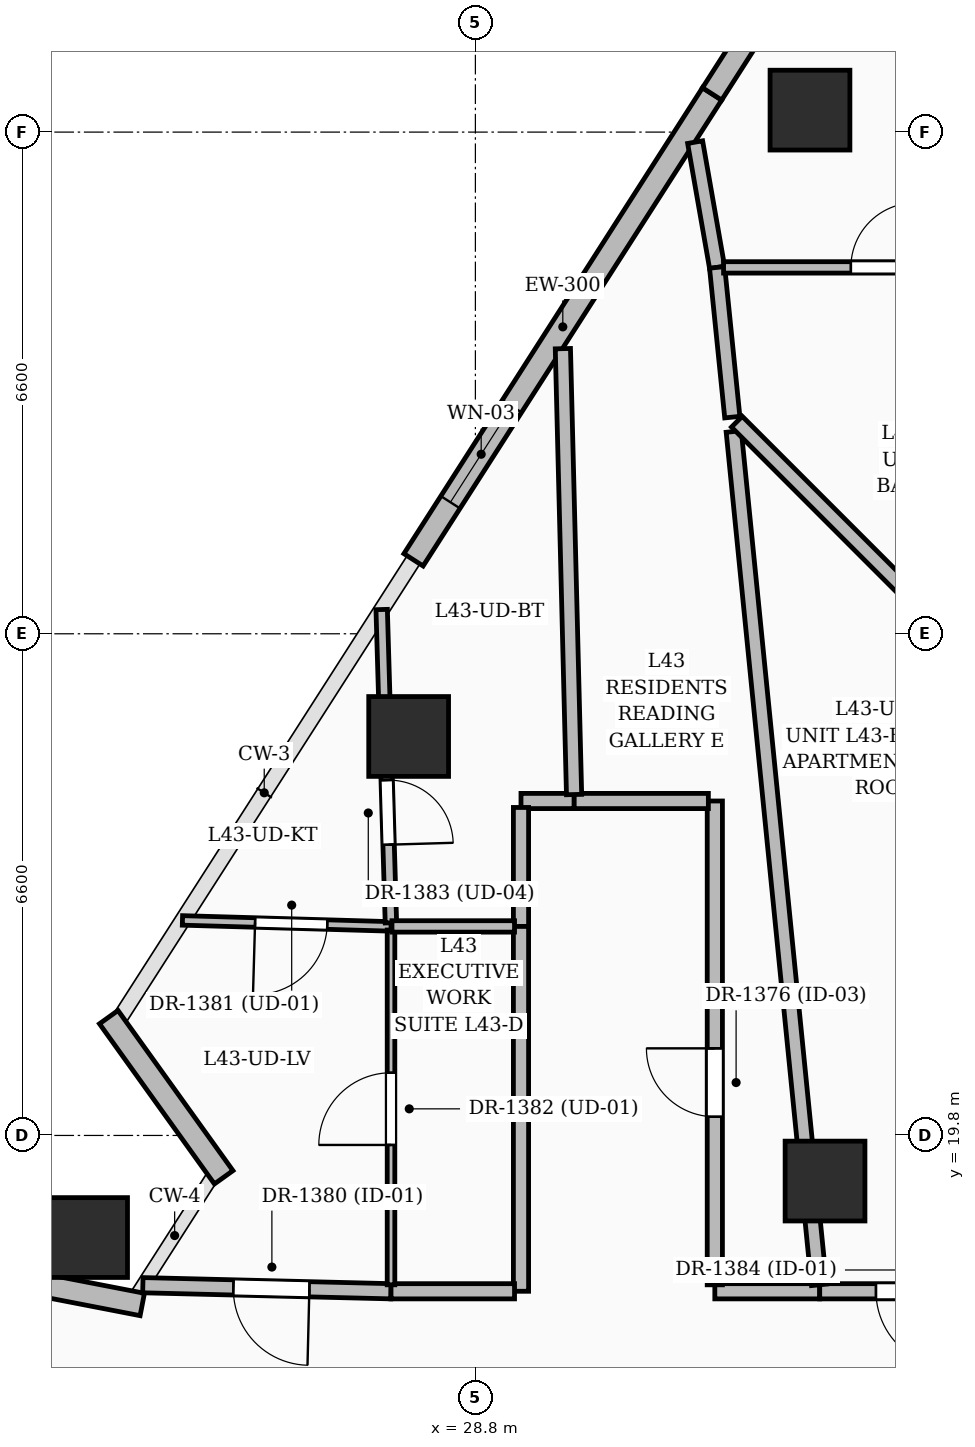
"""IFC4 building model, lengths in metres.
Left out: names, types, materials, properties, quantities, classifications, styles, units other than length and angle.
Written with IfcOpenShell. Run it as: python <this file> out.ifc"""

import sys

from ifc_helpers import new_model, si_unit, direction, frame, frame_2d, origin, origin_2d, place, context, subcontext, project, spatial, rectangle, extrude, element, fill, save


model = new_model("IFC4")
c1 = context("Model", 3, precision=1e-05, world=origin(), true_north=direction((0.0, 1.0)))
c2 = subcontext(c1, "Body", "Model", "MODEL_VIEW")
j1 = project(units=[si_unit("LENGTHUNIT", "METRE"), si_unit("PLANEANGLEUNIT", "RADIAN")], contexts=[c1])
p1 = place(None, origin())
s1 = spatial("IfcSite", under=j1, at=p1, CompositionType="ELEMENT")
p2 = place(p1, origin())
s2 = spatial("IfcBuilding", under=s1, at=p2, CompositionType="ELEMENT")
p3 = place(p2, frame((0.0, 0.0, 168.0)))
s3 = spatial("IfcBuildingStorey", under=s2, at=p3, CompositionType="ELEMENT", Elevation=168.0)
for number, where, z_axis, x_axis in (
    (1, (33.4, 19.2, 0.0), (0.0, 0.0, 1.0), (1.0, 0.0, 0.0)),
    (2, (33.202, 33.289, 0.0), (0.0, 0.0, 1.0), (1.0, 0.0, 0.0)),
    (3, (27.922, 25.049, 0.0), (0.0, 0.0, 1.0), (1.0, 0.0, 0.0)),
    (4, (23.698, 18.457, 0.0), (0.0, 0.0, 1.0), (1.0, 0.0, 0.0)),
):
    element("IfcColumn", number, at=place(p3, frame(where, z_axis=z_axis, x_axis=x_axis)), inside=s3, PredefinedType="COLUMN", context=c2, shape_type="SweptSolid", body=[
        extrude(rectangle(XDim=1.05, YDim=1.05, at=origin_2d()), origin(), (0.0, 0.0, 1.0), 3.6),
    ])
p4 = place(p3, frame((21.871, 18.07, 0.0), z_axis=(0.0, 0.0, 1.0), x_axis=(0.98176398898, -0.190103839891, 0.0)))
e5 = element("IfcWall", 5, at=p4, inside=s3, PredefinedType="SOLIDWALL", context=c2, shape_type="SweptSolid", body=[
    extrude(rectangle(XDim=2.594, YDim=0.3, at=frame_2d((1.297, 0.0))), origin(), (0.0, 0.0, 1.0), 2.398),
])
p5 = place(p3, frame((25.489, 19.249, 0.0), z_axis=(0.0, 0.0, 1.0), x_axis=(-0.58299973372, 0.812472344442, 0.0)))
e6 = element("IfcWall", 6, at=p5, inside=s3, PredefinedType="SOLIDWALL", context=c2, shape_type="SweptSolid", body=[
    extrude(rectangle(XDim=2.594, YDim=0.3, at=frame_2d((1.297, 0.0))), origin(), (0.0, 0.0, 1.0), 2.575),
])
p6 = place(p3, frame((27.986, 27.373, 0.0), z_axis=(0.0, 0.0, 1.0), x_axis=(0.539557017358, 0.841949063198, 0.0)))
e7 = element("IfcWall", 7, at=p6, inside=s3, PredefinedType="SOLIDWALL", context=c2, shape_type="SweptSolid", body=[
    extrude(rectangle(XDim=7.28, YDim=0.3, at=frame_2d((3.64, 0.0))), origin(), (0.0, 0.0, 1.0), 3.35),
])
p7 = place(p6, frame((0.9, 0.0, 0.6)))
e8 = element("IfcOpeningElement", 8, at=p7, cuts=e7, PredefinedType="OPENING", context=c2, shape_type="SweptSolid", body=[
    extrude(rectangle(XDim=1.5, YDim=2.1, at=frame_2d((0.75, 1.05))), frame((0.0, 0.16, 0.0), z_axis=(0.0, -1.0, 0.0), x_axis=(1.0, 0.0, 0.0)), (0.0, 0.0, 1.0), 0.32),
])
p8 = place(p3, frame((31.914, 33.502, 0.0), z_axis=(0.0, 0.0, 1.0), x_axis=(0.539526549497, 0.84196858753, 0.0)))
e9 = element("IfcWall", 9, at=p8, inside=s3, PredefinedType="SOLIDWALL", context=c2, shape_type="SweptSolid", body=[
    extrude(rectangle(XDim=7.281, YDim=0.3, at=frame_2d((3.64, 0.0))), origin(), (0.0, 0.0, 1.0), 3.35),
])
p9 = place(p8, frame((2.55, 0.0, 0.8)))
e10 = element("IfcOpeningElement", 10, at=p9, cuts=e9, PredefinedType="OPENING", context=c2, shape_type="SweptSolid", body=[
    extrude(rectangle(XDim=1.2, YDim=1.8, at=frame_2d((0.6, 0.9))), frame((0.0, 0.16, 0.0), z_axis=(0.0, -1.0, 0.0), x_axis=(1.0, 0.0, 0.0)), (0.0, 0.0, 1.0), 0.32),
])
p10 = place(p3, frame((27.69, 17.75, 0.0), z_axis=(0.0, 0.0, 1.0), x_axis=(-0.999699347991, 0.024519657978, 0.0)))
e11 = element("IfcWall", 11, at=p10, inside=s3, PredefinedType="PARTITIONING", context=c2, shape_type="SweptSolid", body=[
    extrude(rectangle(XDim=3.266, YDim=0.2, at=frame_2d((1.633, 0.0))), origin(), (0.0, 0.0, 1.0), 2.393),
])
p11 = place(p10, frame((1.075, 0.0, 0.0)))
e12 = element("IfcOpeningElement", 12, at=p11, cuts=e11, PredefinedType="OPENING", context=c2, shape_type="SweptSolid", body=[
    extrude(rectangle(XDim=1.0, YDim=2.2, at=frame_2d((0.5, 1.1))), frame((0.0, 0.11, 0.0), z_axis=(0.0, -1.0, 0.0), x_axis=(1.0, 0.0, 0.0)), (0.0, 0.0, 1.0), 0.22),
])
p12 = place(p3, frame((30.1, 24.2, 0.0), z_axis=(0.0, 0.0, 1.0), x_axis=(-1.0, 0.0, 0.0)))
e13 = element("IfcWall", 13, at=p12, inside=s3, PredefinedType="PARTITIONING", context=c2, shape_type="SweptSolid", body=[
    extrude(rectangle(XDim=0.7, YDim=0.2, at=frame_2d((0.35, 0.0))), origin(), (0.0, 0.0, 1.0), 2.771),
])
p13 = place(p3, frame((29.4, 24.115, 0.0), z_axis=(0.0, 0.0, 1.0), x_axis=(0.0, -1.0, 0.0)))
e14 = element("IfcWall", 14, at=p13, inside=s3, PredefinedType="PARTITIONING", context=c2, shape_type="SweptSolid", body=[
    extrude(rectangle(XDim=1.565, YDim=0.2, at=frame_2d((0.782, 0.0))), origin(), (0.0, 0.0, 1.0), 2.393),
])
p14 = place(p3, frame((29.4, 22.55, 0.0), z_axis=(0.0, 0.0, 1.0), x_axis=(0.0, -1.0, 0.0)))
e15 = element("IfcWall", 15, at=p14, inside=s3, PredefinedType="PARTITIONING", context=c2, shape_type="SweptSolid", body=[
    extrude(rectangle(XDim=4.8, YDim=0.2, at=frame_2d((2.4, 0.0))), origin(), (0.0, 0.0, 1.0), 2.771),
])
p15 = place(p3, frame((29.315, 17.75, 0.0), z_axis=(0.0, 0.0, 1.0), x_axis=(-1.0, 0.0, 0.0)))
e16 = element("IfcWall", 16, at=p15, inside=s3, PredefinedType="PARTITIONING", context=c2, shape_type="SweptSolid", body=[
    extrude(rectangle(XDim=1.625, YDim=0.2, at=frame_2d((0.812, 0.0))), origin(), (0.0, 0.0, 1.0), 2.771),
])
p16 = place(p3, frame((33.33, 17.75, 0.0), z_axis=(0.0, 0.0, 1.0), x_axis=(-1.0, 0.0, 0.0)))
e17 = element("IfcWall", 17, at=p16, inside=s3, PredefinedType="PARTITIONING", context=c2, shape_type="SweptSolid", body=[
    extrude(rectangle(XDim=1.38, YDim=0.2, at=frame_2d((0.69, 0.0))), origin(), (0.0, 0.0, 1.0), 3.35),
])
p17 = place(p3, frame((31.95, 17.835, 0.0), z_axis=(0.0, 0.0, 1.0), x_axis=(0.0, 1.0, 0.0)))
e18 = element("IfcWall", 18, at=p17, inside=s3, PredefinedType="PARTITIONING", context=c2, shape_type="SweptSolid", body=[
    extrude(rectangle(XDim=6.365, YDim=0.2, at=frame_2d((3.183, 0.0))), origin(), (0.0, 0.0, 1.0), 2.393),
])
p18 = place(p17, frame((2.211, 0.0, 0.0)))
e19 = element("IfcOpeningElement", 19, at=p18, cuts=e18, PredefinedType="OPENING", context=c2, shape_type="SweptSolid", body=[
    extrude(rectangle(XDim=0.9, YDim=2.1, at=frame_2d((0.45, 1.05))), frame((0.0, 0.11, 0.0), z_axis=(0.0, -1.0, 0.0), x_axis=(1.0, 0.0, 0.0)), (0.0, 0.0, 1.0), 0.22),
])
p19 = place(p3, frame((31.865, 24.2, 0.0), z_axis=(0.0, 0.0, 1.0), x_axis=(-1.0, 0.0, 0.0)))
e20 = element("IfcWall", 20, at=p19, inside=s3, PredefinedType="PARTITIONING", context=c2, shape_type="SweptSolid", body=[
    extrude(rectangle(XDim=1.765, YDim=0.2, at=frame_2d((0.882, 0.0))), origin(), (0.0, 0.0, 1.0), 2.771),
])
p20 = place(p3, frame((35.69, 17.75, 0.0), z_axis=(0.0, 0.0, 1.0), x_axis=(-1.0, 0.0, 0.0)))
e21 = element("IfcWall", 21, at=p20, inside=s3, PredefinedType="PARTITIONING", context=c2, shape_type="SweptSolid", body=[
    extrude(rectangle(XDim=2.36, YDim=0.2, at=frame_2d((1.18, 0.0))), origin(), (0.0, 0.0, 1.0), 2.436),
])
p21 = place(p20, frame((0.62, 0.0, 0.0)))
e22 = element("IfcOpeningElement", 22, at=p21, cuts=e21, PredefinedType="OPENING", context=c2, shape_type="SweptSolid", body=[
    extrude(rectangle(XDim=1.0, YDim=2.2, at=frame_2d((0.5, 1.1))), frame((0.0, 0.11, 0.0), z_axis=(0.0, -1.0, 0.0), x_axis=(1.0, 0.0, 0.0)), (0.0, 0.0, 1.0), 0.22),
])
p22 = place(p3, frame((27.69, 22.55, 0.0), z_axis=(0.0, 0.0, 1.0), x_axis=(-0.999587284498, 0.028727350555, 0.0)))
e23 = element("IfcWall", 23, at=p22, inside=s3, PredefinedType="PARTITIONING", context=c2, shape_type="SweptSolid", body=[
    extrude(rectangle(XDim=2.745, YDim=0.125, at=frame_2d((1.373, 0.0))), origin(), (0.0, 0.0, 1.0), 2.57),
])
p23 = place(p22, frame((0.839, 0.0, 0.0)))
e24 = element("IfcOpeningElement", 24, at=p23, cuts=e23, PredefinedType="OPENING", context=c2, shape_type="SweptSolid", body=[
    extrude(rectangle(XDim=0.95, YDim=2.2, at=frame_2d((0.475, 1.1))), frame((0.0, 0.072, 0.0), z_axis=(0.0, -1.0, 0.0), x_axis=(1.0, 0.0, 0.0)), (0.0, 0.0, 1.0), 0.145),
])
p24 = place(p3, frame((27.69, 17.835, 0.0), z_axis=(0.0, 0.0, 1.0), x_axis=(0.0, 1.0, 0.0)))
e25 = element("IfcWall", 25, at=p24, inside=s3, PredefinedType="PARTITIONING", context=c2, shape_type="SweptSolid", body=[
    extrude(rectangle(XDim=4.667, YDim=0.1, at=frame_2d((2.334, 0.0))), origin(), (0.0, 0.0, 1.0), 2.771),
])
p25 = place(p24, frame((1.84, 0.0, 0.0)))
e26 = element("IfcOpeningElement", 26, at=p25, cuts=e25, PredefinedType="OPENING", context=c2, shape_type="SweptSolid", body=[
    extrude(rectangle(XDim=0.95, YDim=2.2, at=frame_2d((0.475, 1.1))), frame((0.0, 0.06, 0.0), z_axis=(0.0, -1.0, 0.0), x_axis=(1.0, 0.0, 0.0)), (0.0, 0.0, 1.0), 0.12),
])
p26 = place(p3, frame((27.567, 26.719, 0.0), z_axis=(0.0, 0.0, 1.0), x_axis=(0.029545205492, -0.999563445126, 0.0)))
e27 = element("IfcWall", 27, at=p26, inside=s3, PredefinedType="PARTITIONING", context=c2, shape_type="SweptSolid", body=[
    extrude(rectangle(XDim=4.123, YDim=0.15, at=frame_2d((2.062, 0.0))), origin(), (0.0, 0.0, 1.0), 2.57),
])
p27 = place(p26, frame((2.245, 0.0, 0.0)))
e28 = element("IfcOpeningElement", 28, at=p27, cuts=e27, PredefinedType="OPENING", context=c2, shape_type="SweptSolid", body=[
    extrude(rectangle(XDim=0.85, YDim=2.1, at=frame_2d((0.425, 1.05))), frame((0.0, 0.085, 0.0), z_axis=(0.0, -1.0, 0.0), x_axis=(1.0, 0.0, 0.0)), (0.0, 0.0, 1.0), 0.17),
])
p28 = place(p3, frame((27.702, 22.55, 0.0), z_axis=(0.0, 0.0, 1.0), x_axis=(1.0, 0.0, 0.0)))
e29 = element("IfcWall", 29, at=p28, inside=s3, PredefinedType="PARTITIONING", context=c2, shape_type="SweptSolid", body=[
    extrude(rectangle(XDim=1.613, YDim=0.15, at=frame_2d((0.806, 0.0))), origin(), (0.0, 0.0, 1.0), 2.771),
])
p29 = place(p3, frame((30.098, 24.285, 0.0), z_axis=(0.0, 0.0, 1.0), x_axis=(-0.025130446789, 0.999684180451, 0.0)))
e30 = element("IfcWall", 30, at=p29, inside=s3, PredefinedType="PARTITIONING", context=c2, shape_type="SweptSolid", body=[
    extrude(rectangle(XDim=5.868, YDim=0.2, at=frame_2d((2.934, 0.0))), origin(), (0.0, 0.0, 1.0), 2.57),
])
p30 = place(p3, frame((33.322, 17.835, 0.0), z_axis=(0.0, 0.0, 1.0), x_axis=(-0.099499433927, 0.99503761871, 0.0)))
e31 = element("IfcWall", 31, at=p30, inside=s3, PredefinedType="PARTITIONING", context=c2, shape_type="SweptSolid", body=[
    extrude(rectangle(XDim=11.282, YDim=0.2, at=frame_2d((5.641, 0.0))), origin(), (0.0, 0.0, 1.0), 2.393),
])
p31 = place(p3, frame((31.98, 31.22, 0.0), z_axis=(0.0, 0.0, 1.0), x_axis=(-0.17276967515, 0.984962252753, 0.0)))
e32 = element("IfcWall", 32, at=p31, inside=s3, PredefinedType="PARTITIONING", context=c2, shape_type="SweptSolid", body=[
    extrude(rectangle(XDim=1.673, YDim=0.2, at=frame_2d((0.836, 0.0))), origin(), (0.0, 0.0, 1.0), 2.57),
])
p32 = place(p3, frame((32.18, 29.25, 0.0), z_axis=(0.0, 0.0, 1.0), x_axis=(-0.100980739114, 0.994888380839, 0.0)))
e33 = element("IfcWall", 33, at=p32, inside=s3, PredefinedType="PARTITIONING", context=c2, shape_type="SweptSolid", body=[
    extrude(rectangle(XDim=1.98, YDim=0.2, at=frame_2d((0.99, 0.0))), origin(), (0.0, 0.0, 1.0), 2.57),
])
p33 = place(p3, frame((36.262, 25.168, 0.0), z_axis=(0.0, 0.0, 1.0), x_axis=(-0.707128244111, 0.707085317611, 0.0)))
e34 = element("IfcWall", 34, at=p33, inside=s3, PredefinedType="PARTITIONING", context=c2, shape_type="SweptSolid", body=[
    extrude(rectangle(XDim=5.688, YDim=0.2, at=frame_2d((2.844, 0.0))), origin(), (0.0, 0.0, 1.0), 2.771),
])
p34 = place(p3, frame((32.065, 31.22, 0.0), z_axis=(0.0, 0.0, 1.0), x_axis=(1.0, 0.0, 0.0)))
e35 = element("IfcWall", 35, at=p34, inside=s3, PredefinedType="PARTITIONING", context=c2, shape_type="SweptSolid", body=[
    extrude(rectangle(XDim=4.285, YDim=0.15, at=frame_2d((2.143, 0.0))), origin(), (0.0, 0.0, 1.0), 2.393),
])
p35 = place(p34, frame((1.675, 0.0, 0.0)))
e36 = element("IfcOpeningElement", 36, at=p35, cuts=e35, PredefinedType="OPENING", context=c2, shape_type="SweptSolid", body=[
    extrude(rectangle(XDim=0.85, YDim=2.1, at=frame_2d((0.425, 1.05))), frame((0.0, 0.085, 0.0), z_axis=(0.0, -1.0, 0.0), x_axis=(1.0, 0.0, 0.0)), (0.0, 0.0, 1.0), 0.17),
])
p36 = place(p7, origin())
e37 = element("IfcWindow", 37, at=p36, inside=s3, PartitioningType="SINGLE_PANEL", PredefinedType="WINDOW", context=c2, shape_type="SweptSolid", body=[
    extrude(rectangle(XDim=1.5, YDim=2.1, at=frame_2d((0.75, 1.05))), frame((0.0, 0.03, 0.0), z_axis=(0.0, -1.0, 0.0), x_axis=(1.0, 0.0, 0.0)), (0.0, 0.0, 1.0), 0.06),
])
fill(e8, e37)
p37 = place(p18, origin())
e38 = element("IfcDoor", 38, at=p37, inside=s3, OperationType="SINGLE_SWING_RIGHT", PredefinedType="DOOR", context=c2, shape_type="SweptSolid", body=[
    extrude(rectangle(XDim=0.9, YDim=2.1, at=frame_2d((0.45, 1.05))), frame((0.0, 0.025, 0.0), z_axis=(0.0, -1.0, 0.0), x_axis=(1.0, 0.0, 0.0)), (0.0, 0.0, 1.0), 0.05),
])
fill(e19, e38)
p38 = place(p11, origin())
e39 = element("IfcDoor", 39, at=p38, inside=s3, OperationType="SINGLE_SWING_LEFT", PredefinedType="DOOR", context=c2, shape_type="SweptSolid", body=[
    extrude(rectangle(XDim=1.0, YDim=2.2, at=frame_2d((0.5, 1.1))), frame((0.0, 0.025, 0.0), z_axis=(0.0, -1.0, 0.0), x_axis=(1.0, 0.0, 0.0)), (0.0, 0.0, 1.0), 0.05),
])
fill(e12, e39)
p39 = place(p23, origin())
e40 = element("IfcDoor", 40, at=p39, inside=s3, OperationType="SINGLE_SWING_RIGHT", PredefinedType="DOOR", context=c2, shape_type="SweptSolid", body=[
    extrude(rectangle(XDim=0.95, YDim=2.2, at=frame_2d((0.475, 1.1))), frame((0.0, 0.025, 0.0), z_axis=(0.0, -1.0, 0.0), x_axis=(1.0, 0.0, 0.0)), (0.0, 0.0, 1.0), 0.05),
])
fill(e24, e40)
p40 = place(p25, origin())
e41 = element("IfcDoor", 41, at=p40, inside=s3, OperationType="SINGLE_SWING_LEFT", PredefinedType="DOOR", context=c2, shape_type="SweptSolid", body=[
    extrude(rectangle(XDim=0.95, YDim=2.2, at=frame_2d((0.475, 1.1))), frame((0.0, 0.025, 0.0), z_axis=(0.0, -1.0, 0.0), x_axis=(1.0, 0.0, 0.0)), (0.0, 0.0, 1.0), 0.05),
])
fill(e26, e41)
p41 = place(p27, origin())
e42 = element("IfcDoor", 42, at=p41, inside=s3, OperationType="SINGLE_SWING_RIGHT", PredefinedType="DOOR", context=c2, shape_type="SweptSolid", body=[
    extrude(rectangle(XDim=0.85, YDim=2.1, at=frame_2d((0.425, 1.05))), frame((0.0, 0.025, 0.0), z_axis=(0.0, -1.0, 0.0), x_axis=(1.0, 0.0, 0.0)), (0.0, 0.0, 1.0), 0.05),
])
fill(e28, e42)
p42 = place(p21, origin())
e43 = element("IfcDoor", 43, at=p42, inside=s3, OperationType="SINGLE_SWING_LEFT", PredefinedType="DOOR", context=c2, shape_type="SweptSolid", body=[
    extrude(rectangle(XDim=1.0, YDim=2.2, at=frame_2d((0.5, 1.1))), frame((0.0, 0.025, 0.0), z_axis=(0.0, -1.0, 0.0), x_axis=(1.0, 0.0, 0.0)), (0.0, 0.0, 1.0), 0.05),
])
fill(e22, e43)
p43 = place(p35, origin())
e44 = element("IfcDoor", 44, at=p43, inside=s3, OperationType="SINGLE_SWING_RIGHT", PredefinedType="DOOR", context=c2, shape_type="SweptSolid", body=[
    extrude(rectangle(XDim=0.85, YDim=2.1, at=frame_2d((0.425, 1.05))), frame((0.0, 0.025, 0.0), z_axis=(0.0, -1.0, 0.0), x_axis=(1.0, 0.0, 0.0)), (0.0, 0.0, 1.0), 0.05),
])
fill(e36, e44)
save(model, sys.argv[1])
